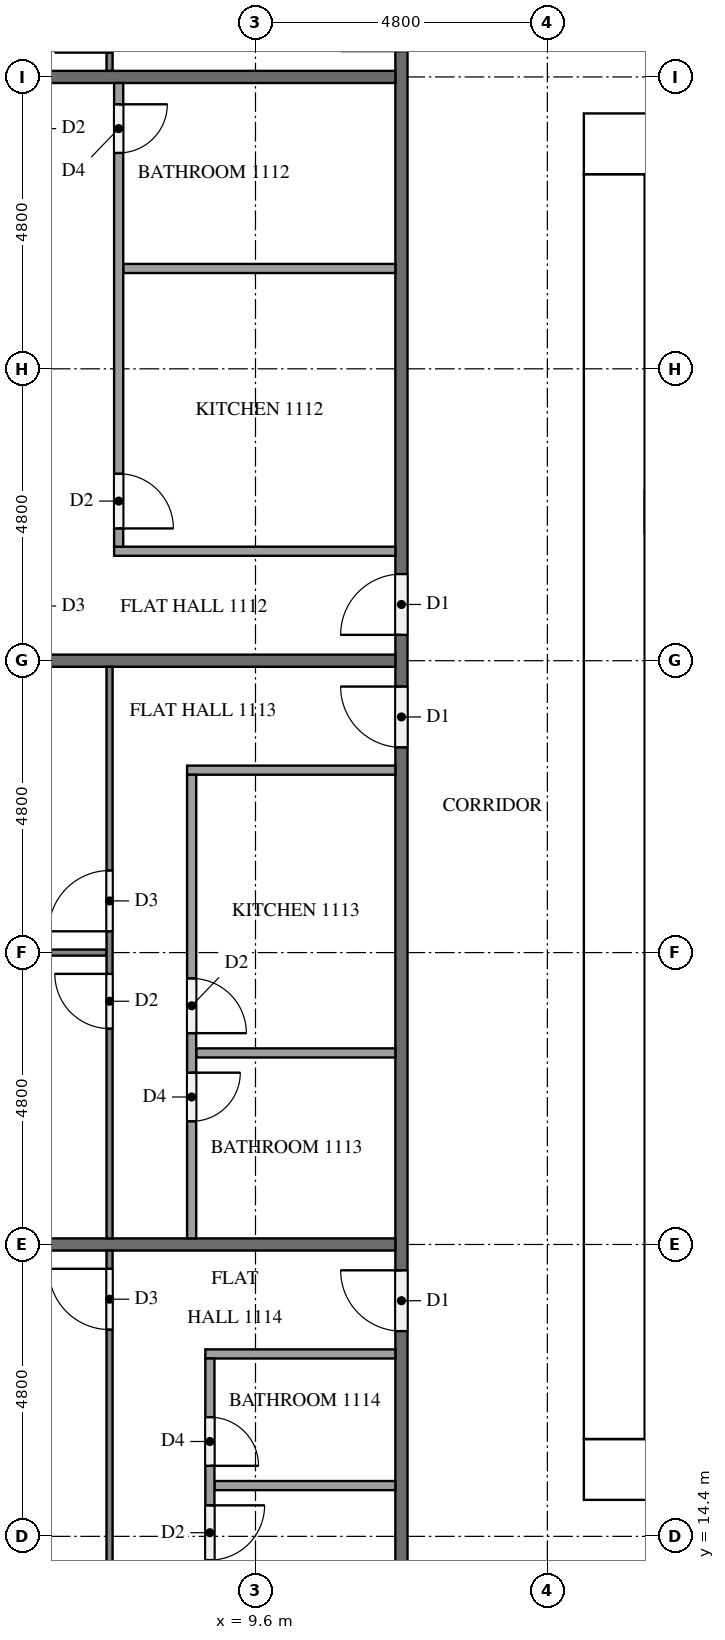
"""IFC4 building model, lengths in metres.
Left out: names, types, materials, properties, quantities, classifications, styles, units other than length and angle.
Written with IfcOpenShell. Run it as: python <this file> out.ifc"""

import sys

from ifc_helpers import new_model, si_unit, direction, frame, frame_2d, origin, place, context, subcontext, project, spatial, rectangle, extrude, element, fill, save


model = new_model("IFC4")
c1 = context("Model", 3, precision=1e-05, world=origin(), true_north=direction((0.0, 1.0)))
c2 = subcontext(c1, "Body", "Model", "MODEL_VIEW")
j1 = project(units=[si_unit("LENGTHUNIT", "METRE"), si_unit("PLANEANGLEUNIT", "RADIAN")], contexts=[c1])
p1 = place(None, origin())
s1 = spatial("IfcSite", under=j1, at=p1, CompositionType="ELEMENT")
p2 = place(p1, origin())
s2 = spatial("IfcBuilding", under=s1, at=p2, CompositionType="ELEMENT")
p3 = place(p2, frame((0.0, 0.0, 46.9)))
s3 = spatial("IfcBuildingStorey", under=s2, at=p3, CompositionType="ELEMENT", Elevation=46.9)
p4 = place(p3, frame((15.0, 15.5, 0.0), z_axis=(0.0, 0.0, 1.0), x_axis=(1.0, 0.0, 0.0)))
e1 = element("IfcWall", 1, at=p4, inside=s3, PredefinedType="SHEAR", context=c2, shape_type="SweptSolid", body=[
    extrude(rectangle(XDim=32.4, YDim=1.0, at=frame_2d((16.2, 0.0))), origin(), (0.0, 0.0, 1.0), 3.2),
])
p5 = place(p4, frame((15.3, 0.0, 0.0)))
e2 = element("IfcOpeningElement", 2, at=p5, cuts=e1, PredefinedType="OPENING", context=c2, shape_type="SweptSolid", body=[
    extrude(rectangle(XDim=1.8, YDim=2.1, at=frame_2d((0.9, 1.05))), frame((0.0, 0.51, 0.0), z_axis=(0.0, -1.0, 0.0), x_axis=(1.0, 0.0, 0.0)), (0.0, 0.0, 1.0), 1.02),
])
p6 = place(p3, frame((15.0, 37.3, 0.0), z_axis=(0.0, 0.0, 1.0), x_axis=(1.0, 0.0, 0.0)))
e3 = element("IfcWall", 3, at=p6, inside=s3, PredefinedType="SHEAR", context=c2, shape_type="SweptSolid", body=[
    extrude(rectangle(XDim=32.4, YDim=1.0, at=frame_2d((16.2, 0.0))), origin(), (0.0, 0.0, 1.0), 3.2),
])
p7 = place(p6, frame((15.3, 0.0, 0.0)))
e4 = element("IfcOpeningElement", 4, at=p7, cuts=e3, PredefinedType="OPENING", context=c2, shape_type="SweptSolid", body=[
    extrude(rectangle(XDim=1.8, YDim=2.1, at=frame_2d((0.9, 1.05))), frame((0.0, 0.51, 0.0), z_axis=(0.0, -1.0, 0.0), x_axis=(1.0, 0.0, 0.0)), (0.0, 0.0, 1.0), 1.02),
])
p8 = place(p6, frame((1.766, 0.0, 0.0)))
e5 = element("IfcOpeningElement", 5, at=p8, cuts=e3, PredefinedType="OPENING", context=c2, shape_type="SweptSolid", body=[
    extrude(rectangle(XDim=1.0, YDim=2.1, at=frame_2d((0.5, 1.05))), frame((0.0, 0.51, 0.0), z_axis=(0.0, -1.0, 0.0), x_axis=(1.0, 0.0, 0.0)), (0.0, 0.0, 1.0), 1.02),
])
p9 = place(p6, frame((5.241, 0.0, 0.0)))
e6 = element("IfcOpeningElement", 6, at=p9, cuts=e3, PredefinedType="OPENING", context=c2, shape_type="SweptSolid", body=[
    extrude(rectangle(XDim=1.0, YDim=2.1, at=frame_2d((0.5, 1.05))), frame((0.0, 0.51, 0.0), z_axis=(0.0, -1.0, 0.0), x_axis=(1.0, 0.0, 0.0)), (0.0, 0.0, 1.0), 1.02),
])
p10 = place(p3, frame((15.5, 16.0, 0.0), z_axis=(0.0, 0.0, 1.0), x_axis=(0.0, 1.0, 0.0)))
e7 = element("IfcWall", 7, at=p10, inside=s3, PredefinedType="SHEAR", context=c2, shape_type="SweptSolid", body=[
    extrude(rectangle(XDim=20.8, YDim=1.0, at=frame_2d((10.4, 0.0))), origin(), (0.0, 0.0, 1.0), 3.2),
])
p11 = place(p10, frame((4.76, 0.0, 0.0)))
e8 = element("IfcOpeningElement", 8, at=p11, cuts=e7, PredefinedType="OPENING", context=c2, shape_type="SweptSolid", body=[
    extrude(rectangle(XDim=1.2, YDim=2.1, at=frame_2d((0.6, 1.05))), frame((0.0, 0.51, 0.0), z_axis=(0.0, -1.0, 0.0), x_axis=(1.0, 0.0, 0.0)), (0.0, 0.0, 1.0), 1.02),
])
p12 = place(p3, frame((12.0, 12.1, 0.0), z_axis=(0.0, 0.0, 1.0), x_axis=(0.0, 1.0, 0.0)))
e9 = element("IfcWall", 9, at=p12, inside=s3, PredefinedType="PARTITIONING", context=c2, shape_type="SweptSolid", body=[
    extrude(rectangle(XDim=28.6, YDim=0.2, at=frame_2d((14.3, 0.0))), origin(), (0.0, 0.0, 1.0), 3.2),
])
p13 = place(p12, frame((26.725, 0.0, 0.0)))
e10 = element("IfcOpeningElement", 10, at=p13, cuts=e9, PredefinedType="OPENING", context=c2, shape_type="SweptSolid", body=[
    extrude(rectangle(XDim=1.0, YDim=2.1, at=frame_2d((0.5, 1.05))), frame((0.0, 0.11, 0.0), z_axis=(0.0, -1.0, 0.0), x_axis=(1.0, 0.0, 0.0)), (0.0, 0.0, 1.0), 0.22),
])
p14 = place(p12, frame((17.125, 0.0, 0.0)))
e11 = element("IfcOpeningElement", 11, at=p14, cuts=e9, PredefinedType="OPENING", context=c2, shape_type="SweptSolid", body=[
    extrude(rectangle(XDim=1.0, YDim=2.1, at=frame_2d((0.5, 1.05))), frame((0.0, 0.11, 0.0), z_axis=(0.0, -1.0, 0.0), x_axis=(1.0, 0.0, 0.0)), (0.0, 0.0, 1.0), 0.22),
])
p15 = place(p12, frame((15.275, 0.0, 0.0)))
e12 = element("IfcOpeningElement", 12, at=p15, cuts=e9, PredefinedType="OPENING", context=c2, shape_type="SweptSolid", body=[
    extrude(rectangle(XDim=1.0, YDim=2.1, at=frame_2d((0.5, 1.05))), frame((0.0, 0.11, 0.0), z_axis=(0.0, -1.0, 0.0), x_axis=(1.0, 0.0, 0.0)), (0.0, 0.0, 1.0), 0.22),
])
p16 = place(p12, frame((5.675, 0.0, 0.0)))
e13 = element("IfcOpeningElement", 13, at=p16, cuts=e9, PredefinedType="OPENING", context=c2, shape_type="SweptSolid", body=[
    extrude(rectangle(XDim=1.0, YDim=2.1, at=frame_2d((0.5, 1.05))), frame((0.0, 0.11, 0.0), z_axis=(0.0, -1.0, 0.0), x_axis=(1.0, 0.0, 0.0)), (0.0, 0.0, 1.0), 0.22),
])
for number, where, z_axis, x_axis in (
    (14, (0.1, 38.4, 0.0), (0.0, 0.0, 1.0), (1.0, 0.0, 0.0)),
    (15, (0.1, 28.8, 0.0), (0.0, 0.0, 1.0), (1.0, 0.0, 0.0)),
    (16, (0.1, 19.2, 0.0), (0.0, 0.0, 1.0), (1.0, 0.0, 0.0)),
):
    element("IfcWall", number, at=place(p3, frame(where, z_axis=z_axis, x_axis=x_axis)), inside=s3, PredefinedType="PARTITIONING", context=c2, shape_type="SweptSolid", body=[
        extrude(rectangle(XDim=11.8, YDim=0.2, at=frame_2d((5.9, 0.0))), origin(), (0.0, 0.0, 1.0), 3.2),
    ])
p17 = place(p3, frame((7.2, 38.5, 0.0), z_axis=(0.0, 0.0, 1.0), x_axis=(0.0, 1.0, 0.0)))
e17 = element("IfcWall", 17, at=p17, inside=s3, PredefinedType="PARTITIONING", context=c2, shape_type="SweptSolid", body=[
    extrude(rectangle(XDim=9.4, YDim=0.1, at=frame_2d((4.7, 0.0))), origin(), (0.0, 0.0, 1.0), 3.2),
])
p18 = place(p17, frame((0.3, 0.0, 0.0)))
e18 = element("IfcOpeningElement", 18, at=p18, cuts=e17, PredefinedType="OPENING", context=c2, shape_type="SweptSolid", body=[
    extrude(rectangle(XDim=0.9, YDim=2.1, at=frame_2d((0.45, 1.05))), frame((0.0, 0.06, 0.0), z_axis=(0.0, -1.0, 0.0), x_axis=(1.0, 0.0, 0.0)), (0.0, 0.0, 1.0), 0.12),
])
p19 = place(p17, frame((8.1, 0.0, 0.0)))
e19 = element("IfcOpeningElement", 19, at=p19, cuts=e17, PredefinedType="OPENING", context=c2, shape_type="SweptSolid", body=[
    extrude(rectangle(XDim=1.0, YDim=2.1, at=frame_2d((0.5, 1.05))), frame((0.0, 0.06, 0.0), z_axis=(0.0, -1.0, 0.0), x_axis=(1.0, 0.0, 0.0)), (0.0, 0.0, 1.0), 0.12),
])
p20 = place(p3, frame((11.9, 35.25, 0.0), z_axis=(0.0, 0.0, 1.0), x_axis=(-1.0, 0.0, 0.0)))
e20 = element("IfcWall", 20, at=p20, inside=s3, PredefinedType="PARTITIONING", context=c2, shape_type="SweptSolid", body=[
    extrude(rectangle(XDim=4.475, YDim=0.15, at=frame_2d((2.237, 0.0))), origin(), (0.0, 0.0, 1.0), 3.2),
])
p21 = place(p3, frame((11.9, 30.6, 0.0), z_axis=(0.0, 0.0, 1.0), x_axis=(-1.0, 0.0, 0.0)))
e21 = element("IfcWall", 21, at=p21, inside=s3, PredefinedType="PARTITIONING", context=c2, shape_type="SweptSolid", body=[
    extrude(rectangle(XDim=4.625, YDim=0.15, at=frame_2d((2.312, 0.0))), origin(), (0.0, 0.0, 1.0), 3.2),
])
p22 = place(p3, frame((7.35, 38.3, 0.0), z_axis=(0.0, 0.0, 1.0), x_axis=(0.0, -1.0, 0.0)))
e22 = element("IfcWall", 22, at=p22, inside=s3, PredefinedType="PARTITIONING", context=c2, shape_type="SweptSolid", body=[
    extrude(rectangle(XDim=7.625, YDim=0.15, at=frame_2d((3.812, 0.0))), origin(), (0.0, 0.0, 1.0), 3.2),
])
p23 = place(p22, frame((6.425, 0.0, 0.0)))
e23 = element("IfcOpeningElement", 23, at=p23, cuts=e22, PredefinedType="OPENING", context=c2, shape_type="SweptSolid", body=[
    extrude(rectangle(XDim=0.9, YDim=2.1, at=frame_2d((0.45, 1.05))), frame((0.0, 0.085, 0.0), z_axis=(0.0, -1.0, 0.0), x_axis=(1.0, 0.0, 0.0)), (0.0, 0.0, 1.0), 0.17),
])
p24 = place(p22, frame((0.35, 0.0, 0.0)))
e24 = element("IfcOpeningElement", 24, at=p24, cuts=e22, PredefinedType="OPENING", context=c2, shape_type="SweptSolid", body=[
    extrude(rectangle(XDim=0.8, YDim=2.1, at=frame_2d((0.4, 1.05))), frame((0.0, 0.085, 0.0), z_axis=(0.0, -1.0, 0.0), x_axis=(1.0, 0.0, 0.0)), (0.0, 0.0, 1.0), 0.17),
])
p25 = place(p3, frame((7.15, 24.0, 0.0), z_axis=(0.0, 0.0, 1.0), x_axis=(-1.0, 0.0, 0.0)))
e25 = element("IfcWall", 25, at=p25, inside=s3, PredefinedType="PARTITIONING", context=c2, shape_type="SweptSolid", body=[
    extrude(rectangle(XDim=6.7, YDim=0.1, at=frame_2d((3.35, 0.0))), origin(), (0.0, 0.0, 1.0), 3.2),
])
p26 = place(p3, frame((7.2, 19.3, 0.0), z_axis=(0.0, 0.0, 1.0), x_axis=(0.0, 1.0, 0.0)))
e26 = element("IfcWall", 26, at=p26, inside=s3, PredefinedType="PARTITIONING", context=c2, shape_type="SweptSolid", body=[
    extrude(rectangle(XDim=9.4, YDim=0.1, at=frame_2d((4.7, 0.0))), origin(), (0.0, 0.0, 1.0), 3.2),
])
p27 = place(p26, frame((5.05, 0.0, 0.0)))
e27 = element("IfcOpeningElement", 27, at=p27, cuts=e26, PredefinedType="OPENING", context=c2, shape_type="SweptSolid", body=[
    extrude(rectangle(XDim=1.0, YDim=2.1, at=frame_2d((0.5, 1.05))), frame((0.0, 0.06, 0.0), z_axis=(0.0, -1.0, 0.0), x_axis=(1.0, 0.0, 0.0)), (0.0, 0.0, 1.0), 0.12),
])
p28 = place(p26, frame((3.45, 0.0, 0.0)))
e28 = element("IfcOpeningElement", 28, at=p28, cuts=e26, PredefinedType="OPENING", context=c2, shape_type="SweptSolid", body=[
    extrude(rectangle(XDim=0.9, YDim=2.1, at=frame_2d((0.45, 1.05))), frame((0.0, 0.06, 0.0), z_axis=(0.0, -1.0, 0.0), x_axis=(1.0, 0.0, 0.0)), (0.0, 0.0, 1.0), 0.12),
])
p29 = place(p3, frame((11.9, 22.35, 0.0), z_axis=(0.0, 0.0, 1.0), x_axis=(-1.0, 0.0, 0.0)))
e29 = element("IfcWall", 29, at=p29, inside=s3, PredefinedType="PARTITIONING", context=c2, shape_type="SweptSolid", body=[
    extrude(rectangle(XDim=3.275, YDim=0.15, at=frame_2d((1.637, 0.0))), origin(), (0.0, 0.0, 1.0), 3.2),
])
p30 = place(p3, frame((11.9, 27.0, 0.0), z_axis=(0.0, 0.0, 1.0), x_axis=(-1.0, 0.0, 0.0)))
e30 = element("IfcWall", 30, at=p30, inside=s3, PredefinedType="PARTITIONING", context=c2, shape_type="SweptSolid", body=[
    extrude(rectangle(XDim=3.425, YDim=0.15, at=frame_2d((1.712, 0.0))), origin(), (0.0, 0.0, 1.0), 3.2),
])
p31 = place(p3, frame((8.55, 26.925, 0.0), z_axis=(0.0, 0.0, 1.0), x_axis=(0.0, -1.0, 0.0)))
e31 = element("IfcWall", 31, at=p31, inside=s3, PredefinedType="PARTITIONING", context=c2, shape_type="SweptSolid", body=[
    extrude(rectangle(XDim=7.625, YDim=0.15, at=frame_2d((3.812, 0.0))), origin(), (0.0, 0.0, 1.0), 3.2),
])
p32 = place(p31, frame((3.35, 0.0, 0.0)))
e32 = element("IfcOpeningElement", 32, at=p32, cuts=e31, PredefinedType="OPENING", context=c2, shape_type="SweptSolid", body=[
    extrude(rectangle(XDim=0.9, YDim=2.1, at=frame_2d((0.45, 1.05))), frame((0.0, 0.085, 0.0), z_axis=(0.0, -1.0, 0.0), x_axis=(1.0, 0.0, 0.0)), (0.0, 0.0, 1.0), 0.17),
])
p33 = place(p31, frame((4.9, 0.0, 0.0)))
e33 = element("IfcOpeningElement", 33, at=p33, cuts=e31, PredefinedType="OPENING", context=c2, shape_type="SweptSolid", body=[
    extrude(rectangle(XDim=0.8, YDim=2.1, at=frame_2d((0.4, 1.05))), frame((0.0, 0.085, 0.0), z_axis=(0.0, -1.0, 0.0), x_axis=(1.0, 0.0, 0.0)), (0.0, 0.0, 1.0), 0.17),
])
p34 = place(p3, frame((7.2, 12.1, 0.0), z_axis=(0.0, 0.0, 1.0), x_axis=(0.0, 1.0, 0.0)))
e34 = element("IfcWall", 34, at=p34, inside=s3, PredefinedType="PARTITIONING", context=c2, shape_type="SweptSolid", body=[
    extrude(rectangle(XDim=7.0, YDim=0.1, at=frame_2d((3.5, 0.0))), origin(), (0.0, 0.0, 1.0), 3.2),
])
p35 = place(p34, frame((5.7, 0.0, 0.0)))
e35 = element("IfcOpeningElement", 35, at=p35, cuts=e34, PredefinedType="OPENING", context=c2, shape_type="SweptSolid", body=[
    extrude(rectangle(XDim=1.0, YDim=2.1, at=frame_2d((0.5, 1.05))), frame((0.0, 0.06, 0.0), z_axis=(0.0, -1.0, 0.0), x_axis=(1.0, 0.0, 0.0)), (0.0, 0.0, 1.0), 0.12),
])
p36 = place(p3, frame((11.9, 15.235, 0.0), z_axis=(0.0, 0.0, 1.0), x_axis=(-1.0, 0.0, 0.0)))
e36 = element("IfcWall", 36, at=p36, inside=s3, PredefinedType="PARTITIONING", context=c2, shape_type="SweptSolid", body=[
    extrude(rectangle(XDim=2.975, YDim=0.15, at=frame_2d((1.487, 0.0))), origin(), (0.0, 0.0, 1.0), 3.2),
])
p37 = place(p3, frame((11.9, 17.4, 0.0), z_axis=(0.0, 0.0, 1.0), x_axis=(-1.0, 0.0, 0.0)))
e37 = element("IfcWall", 37, at=p37, inside=s3, PredefinedType="PARTITIONING", context=c2, shape_type="SweptSolid", body=[
    extrude(rectangle(XDim=3.125, YDim=0.15, at=frame_2d((1.562, 0.0))), origin(), (0.0, 0.0, 1.0), 3.2),
])
p38 = place(p3, frame((8.85, 17.325, 0.0), z_axis=(0.0, 0.0, 1.0), x_axis=(0.0, -1.0, 0.0)))
e38 = element("IfcWall", 38, at=p38, inside=s3, PredefinedType="PARTITIONING", context=c2, shape_type="SweptSolid", body=[
    extrude(rectangle(XDim=5.225, YDim=0.15, at=frame_2d((2.612, 0.0))), origin(), (0.0, 0.0, 1.0), 3.2),
])
p39 = place(p38, frame((0.965, 0.0, 0.0)))
e39 = element("IfcOpeningElement", 39, at=p39, cuts=e38, PredefinedType="OPENING", context=c2, shape_type="SweptSolid", body=[
    extrude(rectangle(XDim=0.8, YDim=2.1, at=frame_2d((0.4, 1.05))), frame((0.0, 0.085, 0.0), z_axis=(0.0, -1.0, 0.0), x_axis=(1.0, 0.0, 0.0)), (0.0, 0.0, 1.0), 0.17),
])
p40 = place(p38, frame((2.415, 0.0, 0.0)))
e40 = element("IfcOpeningElement", 40, at=p40, cuts=e38, PredefinedType="OPENING", context=c2, shape_type="SweptSolid", body=[
    extrude(rectangle(XDim=0.9, YDim=2.1, at=frame_2d((0.45, 1.05))), frame((0.0, 0.085, 0.0), z_axis=(0.0, -1.0, 0.0), x_axis=(1.0, 0.0, 0.0)), (0.0, 0.0, 1.0), 0.17),
])
p41 = place(p11, frame((1.2, 0.0, 0.0), z_axis=(0.0, 0.0, 1.0), x_axis=(-1.0, 0.0, 0.0)))
e41 = element("IfcDoor", 41, at=p41, inside=s3, OperationType="SINGLE_SWING_RIGHT", PredefinedType="DOOR", context=c2, shape_type="SweptSolid", body=[
    extrude(rectangle(XDim=1.2, YDim=2.1, at=frame_2d((0.6, 1.05))), frame((0.0, 0.025, 0.0), z_axis=(0.0, -1.0, 0.0), x_axis=(1.0, 0.0, 0.0)), (0.0, 0.0, 1.0), 0.05),
])
fill(e8, e41)
p42 = place(p14, origin())
e42 = element("IfcDoor", 42, at=p42, inside=s3, OperationType="SINGLE_SWING_LEFT", PredefinedType="DOOR", context=c2, shape_type="SweptSolid", body=[
    extrude(rectangle(XDim=1.0, YDim=2.1, at=frame_2d((0.5, 1.05))), frame((0.0, 0.025, 0.0), z_axis=(0.0, -1.0, 0.0), x_axis=(1.0, 0.0, 0.0)), (0.0, 0.0, 1.0), 0.05),
])
fill(e11, e42)
p43 = place(p15, origin())
e43 = element("IfcDoor", 43, at=p43, inside=s3, OperationType="SINGLE_SWING_RIGHT", PredefinedType="DOOR", context=c2, shape_type="SweptSolid", body=[
    extrude(rectangle(XDim=1.0, YDim=2.1, at=frame_2d((0.5, 1.05))), frame((0.0, 0.025, 0.0), z_axis=(0.0, -1.0, 0.0), x_axis=(1.0, 0.0, 0.0)), (0.0, 0.0, 1.0), 0.05),
])
fill(e12, e43)
p44 = place(p16, origin())
e44 = element("IfcDoor", 44, at=p44, inside=s3, OperationType="SINGLE_SWING_RIGHT", PredefinedType="DOOR", context=c2, shape_type="SweptSolid", body=[
    extrude(rectangle(XDim=1.0, YDim=2.1, at=frame_2d((0.5, 1.05))), frame((0.0, 0.025, 0.0), z_axis=(0.0, -1.0, 0.0), x_axis=(1.0, 0.0, 0.0)), (0.0, 0.0, 1.0), 0.05),
])
fill(e13, e44)
p45 = place(p23, origin())
e45 = element("IfcDoor", 45, at=p45, inside=s3, OperationType="SINGLE_SWING_RIGHT", PredefinedType="DOOR", context=c2, shape_type="SweptSolid", body=[
    extrude(rectangle(XDim=0.9, YDim=2.1, at=frame_2d((0.45, 1.05))), frame((0.0, 0.025, 0.0), z_axis=(0.0, -1.0, 0.0), x_axis=(1.0, 0.0, 0.0)), (0.0, 0.0, 1.0), 0.05),
])
fill(e23, e45)
p46 = place(p24, origin())
e46 = element("IfcDoor", 46, at=p46, inside=s3, OperationType="SINGLE_SWING_LEFT", PredefinedType="DOOR", context=c2, shape_type="SweptSolid", body=[
    extrude(rectangle(XDim=0.8, YDim=2.1, at=frame_2d((0.4, 1.05))), frame((0.0, 0.025, 0.0), z_axis=(0.0, -1.0, 0.0), x_axis=(1.0, 0.0, 0.0)), (0.0, 0.0, 1.0), 0.05),
])
fill(e24, e46)
p47 = place(p27, origin())
e47 = element("IfcDoor", 47, at=p47, inside=s3, OperationType="SINGLE_SWING_LEFT", PredefinedType="DOOR", context=c2, shape_type="SweptSolid", body=[
    extrude(rectangle(XDim=1.0, YDim=2.1, at=frame_2d((0.5, 1.05))), frame((0.0, 0.025, 0.0), z_axis=(0.0, -1.0, 0.0), x_axis=(1.0, 0.0, 0.0)), (0.0, 0.0, 1.0), 0.05),
])
fill(e27, e47)
p48 = place(p28, origin())
e48 = element("IfcDoor", 48, at=p48, inside=s3, OperationType="SINGLE_SWING_RIGHT", PredefinedType="DOOR", context=c2, shape_type="SweptSolid", body=[
    extrude(rectangle(XDim=0.9, YDim=2.1, at=frame_2d((0.45, 1.05))), frame((0.0, 0.025, 0.0), z_axis=(0.0, -1.0, 0.0), x_axis=(1.0, 0.0, 0.0)), (0.0, 0.0, 1.0), 0.05),
])
fill(e28, e48)
p49 = place(p32, origin())
e49 = element("IfcDoor", 49, at=p49, inside=s3, OperationType="SINGLE_SWING_RIGHT", PredefinedType="DOOR", context=c2, shape_type="SweptSolid", body=[
    extrude(rectangle(XDim=0.9, YDim=2.1, at=frame_2d((0.45, 1.05))), frame((0.0, 0.025, 0.0), z_axis=(0.0, -1.0, 0.0), x_axis=(1.0, 0.0, 0.0)), (0.0, 0.0, 1.0), 0.05),
])
fill(e32, e49)
p50 = place(p33, origin())
e50 = element("IfcDoor", 50, at=p50, inside=s3, OperationType="SINGLE_SWING_LEFT", PredefinedType="DOOR", context=c2, shape_type="SweptSolid", body=[
    extrude(rectangle(XDim=0.8, YDim=2.1, at=frame_2d((0.4, 1.05))), frame((0.0, 0.025, 0.0), z_axis=(0.0, -1.0, 0.0), x_axis=(1.0, 0.0, 0.0)), (0.0, 0.0, 1.0), 0.05),
])
fill(e33, e50)
p51 = place(p35, origin())
e51 = element("IfcDoor", 51, at=p51, inside=s3, OperationType="SINGLE_SWING_RIGHT", PredefinedType="DOOR", context=c2, shape_type="SweptSolid", body=[
    extrude(rectangle(XDim=1.0, YDim=2.1, at=frame_2d((0.5, 1.05))), frame((0.0, 0.025, 0.0), z_axis=(0.0, -1.0, 0.0), x_axis=(1.0, 0.0, 0.0)), (0.0, 0.0, 1.0), 0.05),
])
fill(e35, e51)
p52 = place(p39, origin())
e52 = element("IfcDoor", 52, at=p52, inside=s3, OperationType="SINGLE_SWING_RIGHT", PredefinedType="DOOR", context=c2, shape_type="SweptSolid", body=[
    extrude(rectangle(XDim=0.8, YDim=2.1, at=frame_2d((0.4, 1.05))), frame((0.0, 0.025, 0.0), z_axis=(0.0, -1.0, 0.0), x_axis=(1.0, 0.0, 0.0)), (0.0, 0.0, 1.0), 0.05),
])
fill(e39, e52)
p53 = place(p40, origin())
e53 = element("IfcDoor", 53, at=p53, inside=s3, OperationType="SINGLE_SWING_LEFT", PredefinedType="DOOR", context=c2, shape_type="SweptSolid", body=[
    extrude(rectangle(XDim=0.9, YDim=2.1, at=frame_2d((0.45, 1.05))), frame((0.0, 0.025, 0.0), z_axis=(0.0, -1.0, 0.0), x_axis=(1.0, 0.0, 0.0)), (0.0, 0.0, 1.0), 0.05),
])
fill(e40, e53)
save(model, sys.argv[1])
